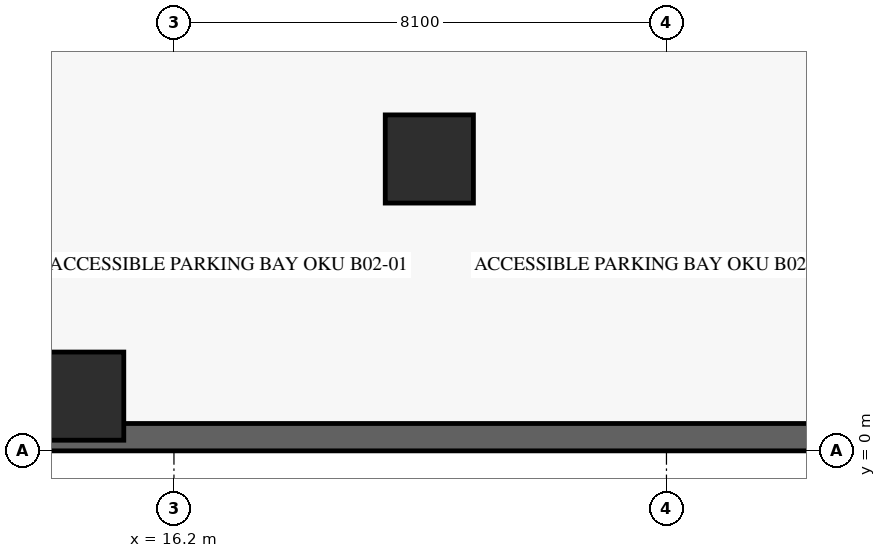
"""IFC4 building model, lengths in metres.
Left out: names, types, materials, properties, quantities, classifications, styles, units other than length and angle.
Written with IfcOpenShell. Run it as: python <this file> out.ifc"""

import sys

from ifc_helpers import new_model, si_unit, direction, frame, frame_2d, origin, origin_2d, place, context, subcontext, project, spatial, rectangle, extrude, source, transform, mapped, element, save


model = new_model("IFC4")
c1 = context("Model", 3, precision=1e-05, world=origin(), true_north=direction((0.0, 1.0)))
c2 = subcontext(c1, "Body", "Model", "MODEL_VIEW")
j1 = project(units=[si_unit("LENGTHUNIT", "METRE"), si_unit("PLANEANGLEUNIT", "RADIAN")], contexts=[c1])
p1 = place(None, origin())
s1 = spatial("IfcSite", under=j1, at=p1, CompositionType="ELEMENT")
p2 = place(p1, origin())
s2 = spatial("IfcBuilding", under=s1, at=p2, CompositionType="ELEMENT")
p3 = place(p2, frame((0.0, 0.0, -7.2)))
s3 = spatial("IfcBuildingStorey", under=s2, at=p3, CompositionType="ELEMENT", Elevation=-7.2)
p4 = place(p3, frame((0.225, 0.225, -0.36), z_axis=(0.0, 0.0, 1.0), x_axis=(1.0, 0.0, 0.0)))
e1 = element("IfcWall", 1, at=p4, inside=s3, PredefinedType="USERDEFINED", context=c2, shape_type="SweptSolid", body=[
    extrude(rectangle(XDim=64.35, YDim=0.45, at=frame_2d((32.175, 0.0))), origin(), (0.0, 0.0, 1.0), 3.598),
])
m1 = source(origin(), c2, "Body", "SweptSolid", [
    extrude(rectangle(XDim=1.45, YDim=1.45, at=origin_2d()), origin(), (0.0, 0.0, 1.0), 3.6),
])
for number, where, z_axis, x_axis in (
    (2, (20.4, 4.8, -0.36), (0.0, 0.0, 1.0), (1.0, 0.0, 0.0)),
    (3, (14.65, 0.9, -0.36), (0.0, 0.0, 1.0), (1.0, 0.0, 0.0)),
):
    element("IfcColumn", number, at=place(p3, frame(where, z_axis=z_axis, x_axis=x_axis)), inside=s3, PredefinedType="COLUMN", context=c2, shape_type="MappedRepresentation", body=[
        mapped(m1, transform((0.0, 0.0, 0.0), scale=1.0)),
    ])
save(model, sys.argv[1])
